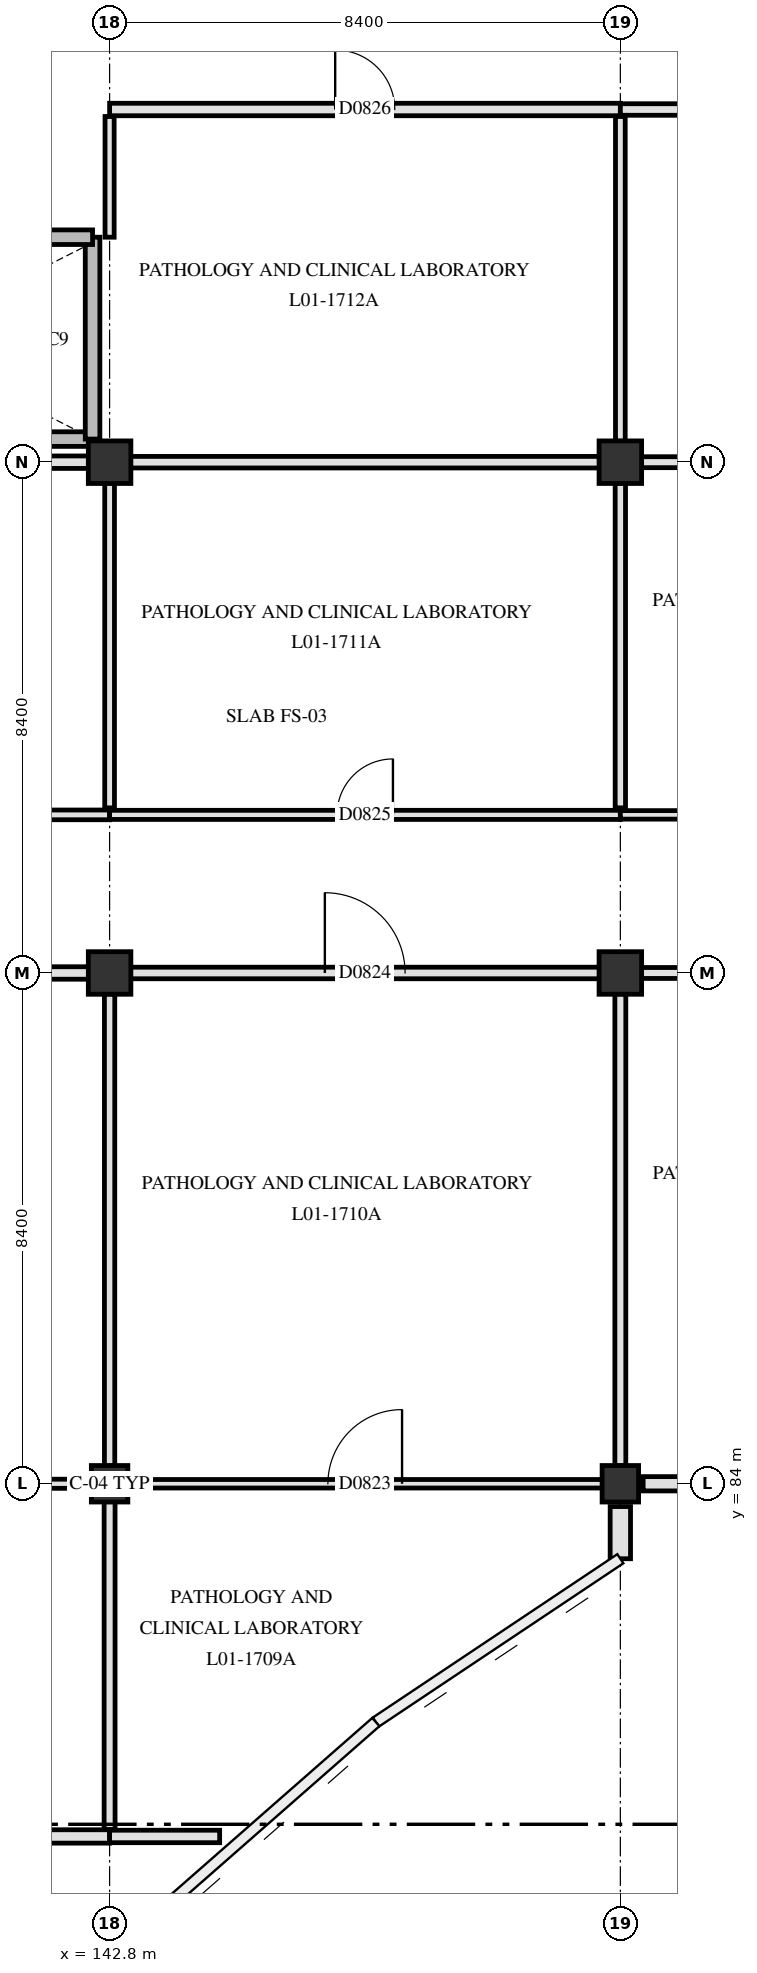
"""IFC4 building model, lengths in metres.
Left out: names, types, materials, properties, quantities, classifications, styles, units other than length and angle.
Written with IfcOpenShell. Run it as: python <this file> out.ifc"""

import sys

from ifc_helpers import new_model, si_unit, direction, frame, frame_2d, origin, origin_2d, place, context, subcontext, project, spatial, rectangle, extrude, element, fill, save


model = new_model("IFC4")
c1 = context("Model", 3, precision=1e-05, world=origin(), true_north=direction((0.0, 1.0)))
c2 = subcontext(c1, "Body", "Model", "MODEL_VIEW")
j1 = project(units=[si_unit("LENGTHUNIT", "METRE"), si_unit("PLANEANGLEUNIT", "RADIAN")], contexts=[c1])
p1 = place(None, origin())
s1 = spatial("IfcSite", under=j1, at=p1, CompositionType="ELEMENT")
p2 = place(p1, origin())
s2 = spatial("IfcBuilding", under=s1, at=p2, CompositionType="ELEMENT")
p3 = place(p2, frame((0.0, 0.0, 4.8)))
s3 = spatial("IfcBuildingStorey", under=s2, at=p3, CompositionType="ELEMENT", Elevation=4.8)
p4 = place(p3, frame((142.8, 84.0, 0.0), z_axis=(0.0, 0.0, 1.0), x_axis=(1.0, 0.0, 0.0)))
e1 = element("IfcColumn", 1, at=p4, inside=s3, PredefinedType="COLUMN", context=c2, shape_type="SweptSolid", body=[
    extrude(rectangle(XDim=0.6, YDim=0.6, at=origin_2d()), origin(), (0.0, 0.0, 1.0), 4.5),
])
for number, where, z_axis, x_axis in (
    (2, (142.8, 92.4, 0.0), (0.0, 0.0, 1.0), (1.0, 0.0, 0.0)),
    (3, (142.8, 100.8, 0.0), (0.0, 0.0, 1.0), (1.0, 0.0, 0.0)),
):
    element("IfcColumn", number, at=place(p3, frame(where, z_axis=z_axis, x_axis=x_axis)), inside=s3, PredefinedType="COLUMN", context=c2, shape_type="SweptSolid", body=[
        extrude(rectangle(XDim=0.7, YDim=0.7, at=origin_2d()), origin(), (0.0, 0.0, 1.0), 4.5),
    ])
p5 = place(p3, frame((151.2, 84.0, 0.0), z_axis=(0.0, 0.0, 1.0), x_axis=(1.0, 0.0, 0.0)))
e4 = element("IfcColumn", 4, at=p5, inside=s3, PredefinedType="COLUMN", context=c2, shape_type="SweptSolid", body=[
    extrude(rectangle(XDim=0.6, YDim=0.6, at=origin_2d()), origin(), (0.0, 0.0, 1.0), 4.5),
])
for number, where, z_axis, x_axis in (
    (5, (151.2, 92.4, 0.0), (0.0, 0.0, 1.0), (1.0, 0.0, 0.0)),
    (6, (151.2, 100.8, 0.0), (0.0, 0.0, 1.0), (1.0, 0.0, 0.0)),
):
    element("IfcColumn", number, at=place(p3, frame(where, z_axis=z_axis, x_axis=x_axis)), inside=s3, PredefinedType="COLUMN", context=c2, shape_type="SweptSolid", body=[
        extrude(rectangle(XDim=0.7, YDim=0.7, at=origin_2d()), origin(), (0.0, 0.0, 1.0), 4.5),
    ])
p6 = place(p3, frame((153.274, 84.0, 0.0), z_axis=(0.0, 0.0, 1.0), x_axis=(-1.0, 0.0, 0.0)))
e7 = element("IfcWall", 7, at=p6, inside=s3, PredefinedType="SOLIDWALL", context=c2, shape_type="SweptSolid", body=[
    extrude(rectangle(XDim=1.699, YDim=0.235, at=frame_2d((0.85, 0.0))), origin(), (0.0, 0.0, 1.0), 4.14),
])
p7 = place(p3, frame((151.2, 83.625, 0.0), z_axis=(0.0, 0.0, 1.0), x_axis=(0.0, -1.0, 0.0)))
e8 = element("IfcWall", 8, at=p7, inside=s3, PredefinedType="SOLIDWALL", context=c2, shape_type="SweptSolid", body=[
    extrude(rectangle(XDim=0.858, YDim=0.335, at=frame_2d((0.429, 0.0))), origin(), (0.0, 0.0, 1.0), 4.14),
])
p8 = place(p3, frame((134.7, 101.18, 0.0), z_axis=(0.0, 0.0, 1.0), x_axis=(1.0, 0.0, 0.0)))
e9 = element("IfcWall", 9, at=p8, inside=s3, PredefinedType="SHEAR", context=c2, shape_type="SweptSolid", body=[
    extrude(rectangle(XDim=7.82, YDim=0.24, at=frame_2d((3.91, 0.0))), origin(), (0.0, 0.0, 1.0), 4.15),
])
p9 = place(p3, frame((142.52, 101.18, 0.0), z_axis=(0.0, 0.0, 1.0), x_axis=(0.0, 1.0, 0.0)))
e10 = element("IfcWall", 10, at=p9, inside=s3, PredefinedType="SHEAR", context=c2, shape_type="SweptSolid", body=[
    extrude(rectangle(XDim=3.32, YDim=0.24, at=frame_2d((1.66, 0.0))), origin(), (0.0, 0.0, 1.0), 4.15),
])
p10 = place(p3, frame((134.7, 104.5, 0.0), z_axis=(0.0, 0.0, 1.0), x_axis=(1.0, 0.0, 0.0)))
e11 = element("IfcWall", 11, at=p10, inside=s3, PredefinedType="SHEAR", context=c2, shape_type="SweptSolid", body=[
    extrude(rectangle(XDim=7.82, YDim=0.24, at=frame_2d((3.91, 0.0))), origin(), (0.0, 0.0, 1.0), 4.15),
])
p11 = place(p10, frame((0.25, 0.0, 0.0)))
e12 = element("IfcOpeningElement", 12, at=p11, cuts=e11, PredefinedType="OPENING", context=c2, shape_type="SweptSolid", body=[
    extrude(rectangle(XDim=1.45, YDim=2.2, at=frame_2d((0.725, 1.1))), frame((0.0, 0.13, 0.0), z_axis=(0.0, -1.0, 0.0), x_axis=(1.0, 0.0, 0.0)), (0.0, 0.0, 1.0), 0.26),
])
p12 = place(p3, frame((137.0, 78.2, 0.0), z_axis=(0.0, 0.0, 1.0), x_axis=(1.0, 0.0, 0.0)))
e13 = element("IfcWall", 13, at=p12, inside=s3, PredefinedType="PARTITIONING", context=c2, shape_type="SweptSolid", body=[
    extrude(rectangle(XDim=5.8, YDim=0.22, at=frame_2d((2.9, 0.0))), origin(), (0.0, 0.0, 1.0), 4.14),
])
p13 = place(p12, frame((2.25, 0.0, 0.0)))
e14 = element("IfcOpeningElement", 14, at=p13, cuts=e13, PredefinedType="OPENING", context=c2, shape_type="SweptSolid", body=[
    extrude(rectangle(XDim=1.3, YDim=2.2, at=frame_2d((0.65, 1.1))), frame((0.0, 0.12, 0.0), z_axis=(0.0, -1.0, 0.0), x_axis=(1.0, 0.0, 0.0)), (0.0, 0.0, 1.0), 0.24),
])
p14 = place(p3, frame((142.8, 78.2, 0.0), z_axis=(0.0, 0.0, 1.0), x_axis=(1.0, 0.0, 0.0)))
e15 = element("IfcWall", 15, at=p14, inside=s3, PredefinedType="PARTITIONING", context=c2, shape_type="SweptSolid", body=[
    extrude(rectangle(XDim=1.81, YDim=0.205, at=frame_2d((0.905, 0.0))), origin(), (0.0, 0.0, 1.0), 4.14),
])
p15 = place(p3, frame((137.0, 84.0, 0.0), z_axis=(0.0, 0.0, 1.0), x_axis=(1.0, 0.0, 0.0)))
e16 = element("IfcWall", 16, at=p15, inside=s3, PredefinedType="PARTITIONING", context=c2, shape_type="SweptSolid", body=[
    extrude(rectangle(XDim=5.505, YDim=0.15, at=frame_2d((2.752, 0.0))), origin(), (0.0, 0.0, 1.0), 3.54),
])
p16 = place(p3, frame((143.095, 84.0, 0.0), z_axis=(0.0, 0.0, 1.0), x_axis=(1.0, 0.0, 0.0)))
e17 = element("IfcWall", 17, at=p16, inside=s3, PredefinedType="PARTITIONING", context=c2, shape_type="SweptSolid", body=[
    extrude(rectangle(XDim=7.81, YDim=0.14, at=frame_2d((3.905, 0.0))), origin(), (0.0, 0.0, 1.0), 3.54),
])
p17 = place(p16, frame((3.295, 0.0, 0.0)))
e18 = element("IfcOpeningElement", 18, at=p17, cuts=e17, PredefinedType="OPENING", context=c2, shape_type="SweptSolid", body=[
    extrude(rectangle(XDim=1.22, YDim=2.18, at=frame_2d((0.61, 1.09))), frame((0.0, 0.08, 0.0), z_axis=(0.0, -1.0, 0.0), x_axis=(1.0, 0.0, 0.0)), (0.0, 0.0, 1.0), 0.16),
])
p18 = place(p3, frame((137.0, 92.4, 0.0), z_axis=(0.0, 0.0, 1.0), x_axis=(1.0, 0.0, 0.0)))
e19 = element("IfcWall", 19, at=p18, inside=s3, PredefinedType="PARTITIONING", context=c2, shape_type="SweptSolid", body=[
    extrude(rectangle(XDim=5.455, YDim=0.205, at=frame_2d((2.728, 0.0))), origin(), (0.0, 0.0, 1.0), 3.54),
])
p19 = place(p18, frame((1.988, 0.0, 0.0)))
e20 = element("IfcOpeningElement", 20, at=p19, cuts=e19, PredefinedType="OPENING", context=c2, shape_type="SweptSolid", body=[
    extrude(rectangle(XDim=1.48, YDim=2.22, at=frame_2d((0.74, 1.11))), frame((0.0, 0.113, 0.0), z_axis=(0.0, -1.0, 0.0), x_axis=(1.0, 0.0, 0.0)), (0.0, 0.0, 1.0), 0.225),
])
p20 = place(p3, frame((143.145, 92.4, 0.0), z_axis=(0.0, 0.0, 1.0), x_axis=(1.0, 0.0, 0.0)))
e21 = element("IfcWall", 21, at=p20, inside=s3, PredefinedType="PARTITIONING", context=c2, shape_type="SweptSolid", body=[
    extrude(rectangle(XDim=7.71, YDim=0.19, at=frame_2d((3.855, 0.0))), origin(), (0.0, 0.0, 1.0), 3.54),
])
p21 = place(p20, frame((3.195, 0.0, 0.0)))
e22 = element("IfcOpeningElement", 22, at=p21, cuts=e21, PredefinedType="OPENING", context=c2, shape_type="SweptSolid", body=[
    extrude(rectangle(XDim=1.32, YDim=2.18, at=frame_2d((0.66, 1.09))), frame((0.0, 0.105, 0.0), z_axis=(0.0, -1.0, 0.0), x_axis=(1.0, 0.0, 0.0)), (0.0, 0.0, 1.0), 0.21),
])
p22 = place(p3, frame((151.545, 92.4, 0.0), z_axis=(0.0, 0.0, 1.0), x_axis=(1.0, 0.0, 0.0)))
e23 = element("IfcWall", 23, at=p22, inside=s3, PredefinedType="PARTITIONING", context=c2, shape_type="SweptSolid", body=[
    extrude(rectangle(XDim=7.71, YDim=0.18, at=frame_2d((3.855, 0.0))), origin(), (0.0, 0.0, 1.0), 3.54),
])
p23 = place(p22, frame((3.18, 0.0, 0.0)))
e24 = element("IfcOpeningElement", 24, at=p23, cuts=e23, PredefinedType="OPENING", context=c2, shape_type="SweptSolid", body=[
    extrude(rectangle(XDim=1.35, YDim=2.2, at=frame_2d((0.675, 1.1))), frame((0.0, 0.1, 0.0), z_axis=(0.0, -1.0, 0.0), x_axis=(1.0, 0.0, 0.0)), (0.0, 0.0, 1.0), 0.2),
])
p24 = place(p3, frame((137.0, 95.0, 0.0), z_axis=(0.0, 0.0, 1.0), x_axis=(1.0, 0.0, 0.0)))
e25 = element("IfcWall", 25, at=p24, inside=s3, PredefinedType="PARTITIONING", context=c2, shape_type="SweptSolid", body=[
    extrude(rectangle(XDim=5.8, YDim=0.16, at=frame_2d((2.9, 0.0))), origin(), (0.0, 0.0, 1.0), 3.59),
])
p25 = place(p24, frame((2.13, 0.0, 0.0)))
e26 = element("IfcOpeningElement", 26, at=p25, cuts=e25, PredefinedType="OPENING", context=c2, shape_type="SweptSolid", body=[
    extrude(rectangle(XDim=1.54, YDim=2.24, at=frame_2d((0.77, 1.12))), frame((0.0, 0.09, 0.0), z_axis=(0.0, -1.0, 0.0), x_axis=(1.0, 0.0, 0.0)), (0.0, 0.0, 1.0), 0.18),
])
p26 = place(p3, frame((142.8, 95.0, 0.0), z_axis=(0.0, 0.0, 1.0), x_axis=(1.0, 0.0, 0.0)))
e27 = element("IfcWall", 27, at=p26, inside=s3, PredefinedType="PARTITIONING", context=c2, shape_type="SweptSolid", body=[
    extrude(rectangle(XDim=8.4, YDim=0.15, at=frame_2d((4.2, 0.0))), origin(), (0.0, 0.0, 1.0), 3.59),
])
p27 = place(p26, frame((3.74, 0.0, 0.0)))
e28 = element("IfcOpeningElement", 28, at=p27, cuts=e27, PredefinedType="OPENING", context=c2, shape_type="SweptSolid", body=[
    extrude(rectangle(XDim=0.92, YDim=2.08, at=frame_2d((0.46, 1.04))), frame((0.0, 0.085, 0.0), z_axis=(0.0, -1.0, 0.0), x_axis=(1.0, 0.0, 0.0)), (0.0, 0.0, 1.0), 0.17),
])
p28 = place(p3, frame((151.2, 95.0, 0.0), z_axis=(0.0, 0.0, 1.0), x_axis=(1.0, 0.0, 0.0)))
e29 = element("IfcWall", 29, at=p28, inside=s3, PredefinedType="PARTITIONING", context=c2, shape_type="SweptSolid", body=[
    extrude(rectangle(XDim=8.4, YDim=0.14, at=frame_2d((4.2, 0.0))), origin(), (0.0, 0.0, 1.0), 3.59),
])
p29 = place(p28, frame((3.475, 0.0, 0.0)))
e30 = element("IfcOpeningElement", 30, at=p29, cuts=e29, PredefinedType="OPENING", context=c2, shape_type="SweptSolid", body=[
    extrude(rectangle(XDim=1.45, YDim=2.2, at=frame_2d((0.725, 1.1))), frame((0.0, 0.08, 0.0), z_axis=(0.0, -1.0, 0.0), x_axis=(1.0, 0.0, 0.0)), (0.0, 0.0, 1.0), 0.16),
])
p30 = place(p3, frame((137.0, 100.8, 0.0), z_axis=(0.0, 0.0, 1.0), x_axis=(1.0, 0.0, 0.0)))
e31 = element("IfcWall", 31, at=p30, inside=s3, PredefinedType="PARTITIONING", context=c2, shape_type="SweptSolid", body=[
    extrude(rectangle(XDim=5.455, YDim=0.205, at=frame_2d((2.728, 0.0))), origin(), (0.0, 0.0, 1.0), 3.54),
])
p31 = place(p3, frame((143.145, 100.8, 0.0), z_axis=(0.0, 0.0, 1.0), x_axis=(1.0, 0.0, 0.0)))
e32 = element("IfcWall", 32, at=p31, inside=s3, PredefinedType="PARTITIONING", context=c2, shape_type="SweptSolid", body=[
    extrude(rectangle(XDim=7.71, YDim=0.19, at=frame_2d((3.855, 0.0))), origin(), (0.0, 0.0, 1.0), 3.54),
])
p32 = place(p3, frame((151.545, 100.8, 0.0), z_axis=(0.0, 0.0, 1.0), x_axis=(1.0, 0.0, 0.0)))
e33 = element("IfcWall", 33, at=p32, inside=s3, PredefinedType="PARTITIONING", context=c2, shape_type="SweptSolid", body=[
    extrude(rectangle(XDim=7.71, YDim=0.18, at=frame_2d((3.855, 0.0))), origin(), (0.0, 0.0, 1.0), 3.54),
])
p33 = place(p3, frame((142.8, 106.6, 0.0), z_axis=(0.0, 0.0, 1.0), x_axis=(1.0, 0.0, 0.0)))
e34 = element("IfcWall", 34, at=p33, inside=s3, PredefinedType="PARTITIONING", context=c2, shape_type="SweptSolid", body=[
    extrude(rectangle(XDim=8.4, YDim=0.205, at=frame_2d((4.2, 0.0))), origin(), (0.0, 0.0, 1.0), 3.59),
])
p34 = place(p33, frame((3.71, 0.0, 0.0)))
e35 = element("IfcOpeningElement", 35, at=p34, cuts=e34, PredefinedType="OPENING", context=c2, shape_type="SweptSolid", body=[
    extrude(rectangle(XDim=0.98, YDim=2.12, at=frame_2d((0.49, 1.06))), frame((0.0, 0.113, 0.0), z_axis=(0.0, -1.0, 0.0), x_axis=(1.0, 0.0, 0.0)), (0.0, 0.0, 1.0), 0.225),
])
p35 = place(p3, frame((151.2, 106.6, 0.0), z_axis=(0.0, 0.0, 1.0), x_axis=(1.0, 0.0, 0.0)))
e36 = element("IfcWall", 36, at=p35, inside=s3, PredefinedType="PARTITIONING", context=c2, shape_type="SweptSolid", body=[
    extrude(rectangle(XDim=8.4, YDim=0.19, at=frame_2d((4.2, 0.0))), origin(), (0.0, 0.0, 1.0), 3.59),
])
p36 = place(p35, frame((3.4, 0.0, 0.0)))
e37 = element("IfcOpeningElement", 37, at=p36, cuts=e36, PredefinedType="OPENING", context=c2, shape_type="SweptSolid", body=[
    extrude(rectangle(XDim=1.6, YDim=2.25, at=frame_2d((0.8, 1.125))), frame((0.0, 0.105, 0.0), z_axis=(0.0, -1.0, 0.0), x_axis=(1.0, 0.0, 0.0)), (0.0, 0.0, 1.0), 0.21),
])
p37 = place(p3, frame((142.8, 78.315, 0.0), z_axis=(0.0, 0.0, 1.0), x_axis=(0.0, 1.0, 0.0)))
e38 = element("IfcWall", 38, at=p37, inside=s3, PredefinedType="PARTITIONING", context=c2, shape_type="SweptSolid", body=[
    extrude(rectangle(XDim=5.39, YDim=0.18, at=frame_2d((2.695, 0.0))), origin(), (0.0, 0.0, 1.0), 4.14),
])
p38 = place(p3, frame((142.8, 84.295, 0.0), z_axis=(0.0, 0.0, 1.0), x_axis=(0.0, 1.0, 0.0)))
e39 = element("IfcWall", 39, at=p38, inside=s3, PredefinedType="PARTITIONING", context=c2, shape_type="SweptSolid", body=[
    extrude(rectangle(XDim=7.76, YDim=0.17, at=frame_2d((3.88, 0.0))), origin(), (0.0, 0.0, 1.0), 3.59),
])
p39 = place(p3, frame((142.8, 95.115, 0.0), z_axis=(0.0, 0.0, 1.0), x_axis=(0.0, 1.0, 0.0)))
e40 = element("IfcWall", 40, at=p39, inside=s3, PredefinedType="PARTITIONING", context=c2, shape_type="SweptSolid", body=[
    extrude(rectangle(XDim=5.34, YDim=0.16, at=frame_2d((2.67, 0.0))), origin(), (0.0, 0.0, 1.0), 3.59),
])
p40 = place(p3, frame((142.8, 104.5, 0.0), z_axis=(0.0, 0.0, 1.0), x_axis=(0.0, 1.0, 0.0)))
e41 = element("IfcWall", 41, at=p40, inside=s3, PredefinedType="PARTITIONING", context=c2, shape_type="SweptSolid", body=[
    extrude(rectangle(XDim=1.985, YDim=0.15, at=frame_2d((0.993, 0.0))), origin(), (0.0, 0.0, 1.0), 3.59),
])
p41 = place(p3, frame((151.2, 84.295, 0.0), z_axis=(0.0, 0.0, 1.0), x_axis=(0.0, 1.0, 0.0)))
e42 = element("IfcWall", 42, at=p41, inside=s3, PredefinedType="PARTITIONING", context=c2, shape_type="SweptSolid", body=[
    extrude(rectangle(XDim=7.76, YDim=0.18, at=frame_2d((3.88, 0.0))), origin(), (0.0, 0.0, 1.0), 3.59),
])
p42 = place(p3, frame((151.2, 95.115, 0.0), z_axis=(0.0, 0.0, 1.0), x_axis=(0.0, 1.0, 0.0)))
e43 = element("IfcWall", 43, at=p42, inside=s3, PredefinedType="PARTITIONING", context=c2, shape_type="SweptSolid", body=[
    extrude(rectangle(XDim=5.34, YDim=0.17, at=frame_2d((2.67, 0.0))), origin(), (0.0, 0.0, 1.0), 3.59),
])
p43 = place(p3, frame((151.2, 101.145, 0.0), z_axis=(0.0, 0.0, 1.0), x_axis=(0.0, 1.0, 0.0)))
e44 = element("IfcWall", 44, at=p43, inside=s3, PredefinedType="PARTITIONING", context=c2, shape_type="SweptSolid", body=[
    extrude(rectangle(XDim=5.34, YDim=0.16, at=frame_2d((2.67, 0.0))), origin(), (0.0, 0.0, 1.0), 3.59),
])
p44 = place(p17, origin())
e45 = element("IfcDoor", 45, at=p44, inside=s3, OperationType="SINGLE_SWING_RIGHT", PredefinedType="DOOR", context=c2, shape_type="SweptSolid", body=[
    extrude(rectangle(XDim=1.22, YDim=2.18, at=frame_2d((0.61, 1.09))), frame((0.0, 0.025, 0.0), z_axis=(0.0, -1.0, 0.0), x_axis=(1.0, 0.0, 0.0)), (0.0, 0.0, 1.0), 0.05),
])
fill(e18, e45)
p45 = place(p21, origin())
e46 = element("IfcDoor", 46, at=p45, inside=s3, OperationType="SINGLE_SWING_LEFT", PredefinedType="DOOR", context=c2, shape_type="SweptSolid", body=[
    extrude(rectangle(XDim=1.32, YDim=2.18, at=frame_2d((0.66, 1.09))), frame((0.0, 0.025, 0.0), z_axis=(0.0, -1.0, 0.0), x_axis=(1.0, 0.0, 0.0)), (0.0, 0.0, 1.0), 0.05),
])
fill(e22, e46)
p46 = place(p27, origin())
e47 = element("IfcDoor", 47, at=p46, inside=s3, OperationType="SINGLE_SWING_RIGHT", PredefinedType="DOOR", context=c2, shape_type="SweptSolid", body=[
    extrude(rectangle(XDim=0.92, YDim=2.08, at=frame_2d((0.46, 1.04))), frame((0.0, 0.025, 0.0), z_axis=(0.0, -1.0, 0.0), x_axis=(1.0, 0.0, 0.0)), (0.0, 0.0, 1.0), 0.05),
])
fill(e28, e47)
p47 = place(p34, origin())
e48 = element("IfcDoor", 48, at=p47, inside=s3, OperationType="SINGLE_SWING_LEFT", PredefinedType="DOOR", context=c2, shape_type="SweptSolid", body=[
    extrude(rectangle(XDim=0.98, YDim=2.12, at=frame_2d((0.49, 1.06))), frame((0.0, 0.025, 0.0), z_axis=(0.0, -1.0, 0.0), x_axis=(1.0, 0.0, 0.0)), (0.0, 0.0, 1.0), 0.05),
])
fill(e35, e48)
save(model, sys.argv[1])
